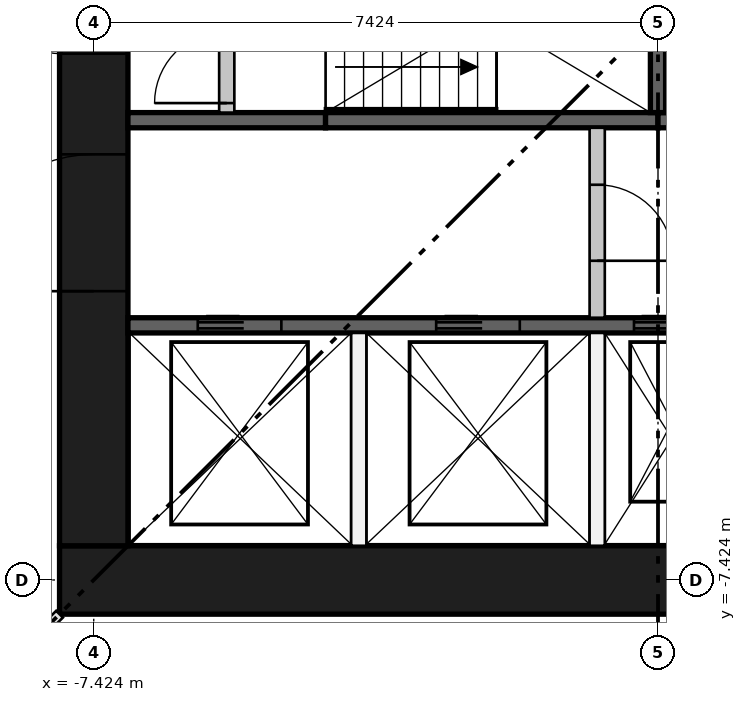
"""IFC4 building model, lengths in metres.
Left out: names, types, materials, properties, quantities, classifications, styles, units other than length and angle.
Written with IfcOpenShell. Run it as: python <this file> out.ifc"""

import sys

from ifc_helpers import new_model, si_unit, direction, frame, frame_2d, origin, place, context, subcontext, project, spatial, rectangle, extrude, element, fill, save


model = new_model("IFC4")
c1 = context("Model", 3, precision=1e-05, world=origin(), true_north=direction((0.0, 1.0)))
c2 = subcontext(c1, "Body", "Model", "MODEL_VIEW")
j1 = project(units=[si_unit("LENGTHUNIT", "METRE"), si_unit("PLANEANGLEUNIT", "RADIAN")], contexts=[c1])
p1 = place(None, origin())
s1 = spatial("IfcSite", under=j1, at=p1, CompositionType="ELEMENT")
p2 = place(p1, origin())
s2 = spatial("IfcBuilding", under=s1, at=p2, CompositionType="ELEMENT")
p3 = place(p2, frame((0.0, 0.0, 14.4)))
s3 = spatial("IfcBuildingStorey", under=s2, at=p3, CompositionType="ELEMENT", Elevation=14.4)
p4 = place(p3, frame((-7.874, -7.424, 0.0), z_axis=(0.0, 0.0, 1.0), x_axis=(1.0, 0.0, 0.0)))
e1 = element("IfcWall", 1, at=p4, inside=s3, PredefinedType="SHEAR", context=c2, shape_type="SweptSolid", body=[
    extrude(rectangle(XDim=15.748, YDim=0.9, at=frame_2d((7.874, 0.0))), origin(), (0.0, 0.0, 1.0), 4.1),
])
p5 = place(p3, frame((-7.424, -6.974, 0.0), z_axis=(0.0, 0.0, 1.0), x_axis=(0.0, 1.0, 0.0)))
e2 = element("IfcWall", 2, at=p5, inside=s3, PredefinedType="SHEAR", context=c2, shape_type="SweptSolid", body=[
    extrude(rectangle(XDim=13.948, YDim=0.9, at=frame_2d((6.974, 0.0))), origin(), (0.0, 0.0, 1.0), 4.1),
])
p6 = place(p5, frame((6.474, 0.0, 0.0)))
e3 = element("IfcOpeningElement", 3, at=p6, cuts=e2, PredefinedType="OPENING", context=c2, shape_type="SweptSolid", body=[
    extrude(rectangle(XDim=1.0, YDim=2.1, at=frame_2d((0.5, 1.05))), frame((0.0, 0.46, 0.0), z_axis=(0.0, -1.0, 0.0), x_axis=(1.0, 0.0, 0.0)), (0.0, 0.0, 1.0), 0.92),
])
p7 = place(p5, frame((3.35, 0.0, 0.0)))
e4 = element("IfcOpeningElement", 4, at=p7, cuts=e2, PredefinedType="OPENING", context=c2, shape_type="SweptSolid", body=[
    extrude(rectangle(XDim=1.8, YDim=2.1, at=frame_2d((0.9, 1.05))), frame((0.0, 0.46, 0.0), z_axis=(0.0, -1.0, 0.0), x_axis=(1.0, 0.0, 0.0)), (0.0, 0.0, 1.0), 0.92),
])
p8 = place(p5, frame((8.799, 0.0, 0.0)))
e5 = element("IfcOpeningElement", 5, at=p8, cuts=e2, PredefinedType="OPENING", context=c2, shape_type="SweptSolid", body=[
    extrude(rectangle(XDim=1.8, YDim=2.1, at=frame_2d((0.9, 1.05))), frame((0.0, 0.46, 0.0), z_axis=(0.0, -1.0, 0.0), x_axis=(1.0, 0.0, 0.0)), (0.0, 0.0, 1.0), 0.92),
])
p9 = place(p5, frame((11.974, 0.0, 0.0)))
e6 = element("IfcOpeningElement", 6, at=p9, cuts=e2, PredefinedType="OPENING", context=c2, shape_type="SweptSolid", body=[
    extrude(rectangle(XDim=1.0, YDim=2.1, at=frame_2d((0.5, 1.05))), frame((0.0, 0.46, 0.0), z_axis=(0.0, -1.0, 0.0), x_axis=(1.0, 0.0, 0.0)), (0.0, 0.0, 1.0), 0.92),
])
p10 = place(p3, frame((-6.974, -4.074, 0.0), z_axis=(0.0, 0.0, 1.0), x_axis=(1.0, 0.0, 0.0)))
e7 = element("IfcWall", 7, at=p10, inside=s3, PredefinedType="SHEAR", context=c2, shape_type="SweptSolid", body=[
    extrude(rectangle(XDim=13.948, YDim=0.2, at=frame_2d((6.974, 0.0))), origin(), (0.0, 0.0, 1.0), 3.7),
])
p11 = place(p10, frame((0.918, 0.0, 0.0)))
e8 = element("IfcOpeningElement", 8, at=p11, cuts=e7, PredefinedType="OPENING", context=c2, shape_type="SweptSolid", body=[
    extrude(rectangle(XDim=1.1, YDim=2.1, at=frame_2d((0.55, 1.05))), frame((0.0, 0.11, 0.0), z_axis=(0.0, -1.0, 0.0), x_axis=(1.0, 0.0, 0.0)), (0.0, 0.0, 1.0), 0.22),
])
p12 = place(p10, frame((4.055, 0.0, 0.0)))
e9 = element("IfcOpeningElement", 9, at=p12, cuts=e7, PredefinedType="OPENING", context=c2, shape_type="SweptSolid", body=[
    extrude(rectangle(XDim=1.1, YDim=2.1, at=frame_2d((0.55, 1.05))), frame((0.0, 0.11, 0.0), z_axis=(0.0, -1.0, 0.0), x_axis=(1.0, 0.0, 0.0)), (0.0, 0.0, 1.0), 0.22),
])
p13 = place(p10, frame((6.658, 0.0, 0.0)))
e10 = element("IfcOpeningElement", 10, at=p13, cuts=e7, PredefinedType="OPENING", context=c2, shape_type="SweptSolid", body=[
    extrude(rectangle(XDim=1.0, YDim=2.1, at=frame_2d((0.5, 1.05))), frame((0.0, 0.11, 0.0), z_axis=(0.0, -1.0, 0.0), x_axis=(1.0, 0.0, 0.0)), (0.0, 0.0, 1.0), 0.22),
])
p14 = place(p10, frame((8.627, 0.0, 0.0)))
e11 = element("IfcOpeningElement", 11, at=p14, cuts=e7, PredefinedType="OPENING", context=c2, shape_type="SweptSolid", body=[
    extrude(rectangle(XDim=1.0, YDim=2.1, at=frame_2d((0.5, 1.05))), frame((0.0, 0.11, 0.0), z_axis=(0.0, -1.0, 0.0), x_axis=(1.0, 0.0, 0.0)), (0.0, 0.0, 1.0), 0.22),
])
p15 = place(p10, frame((10.595, 0.0, 0.0)))
e12 = element("IfcOpeningElement", 12, at=p15, cuts=e7, PredefinedType="OPENING", context=c2, shape_type="SweptSolid", body=[
    extrude(rectangle(XDim=1.0, YDim=2.1, at=frame_2d((0.5, 1.05))), frame((0.0, 0.11, 0.0), z_axis=(0.0, -1.0, 0.0), x_axis=(1.0, 0.0, 0.0)), (0.0, 0.0, 1.0), 0.22),
])
p16 = place(p10, frame((12.564, 0.0, 0.0)))
e13 = element("IfcOpeningElement", 13, at=p16, cuts=e7, PredefinedType="OPENING", context=c2, shape_type="SweptSolid", body=[
    extrude(rectangle(XDim=1.0, YDim=2.1, at=frame_2d((0.5, 1.05))), frame((0.0, 0.11, 0.0), z_axis=(0.0, -1.0, 0.0), x_axis=(1.0, 0.0, 0.0)), (0.0, 0.0, 1.0), 0.22),
])
p17 = place(p3, frame((-6.974, -1.375, 0.0), z_axis=(0.0, 0.0, 1.0), x_axis=(1.0, 0.0, 0.0)))
e14 = element("IfcWall", 14, at=p17, inside=s3, PredefinedType="SHEAR", context=c2, shape_type="SweptSolid", body=[
    extrude(rectangle(XDim=2.6, YDim=0.2, at=frame_2d((1.3, 0.0))), origin(), (0.0, 0.0, 1.0), 3.7),
])
for number, where, z_axis, x_axis in (
    (15, (-4.374, -1.375, 0.0), (0.0, 0.0, 1.0), (1.0, 0.0, 0.0)),
    (16, (0.0, -1.375, 0.0), (0.0, 0.0, 1.0), (1.0, 0.0, 0.0)),
):
    element("IfcWall", number, at=place(p3, frame(where, z_axis=z_axis, x_axis=x_axis)), inside=s3, PredefinedType="SHEAR", context=c2, shape_type="SweptSolid", body=[
        extrude(rectangle(XDim=4.374, YDim=0.2, at=frame_2d((2.187, 0.0))), origin(), (0.0, 0.0, 1.0), 3.7),
    ])
p18 = place(p3, frame((0.0, -1.275, 0.0), z_axis=(0.0, 0.0, 1.0), x_axis=(0.0, 1.0, 0.0)))
e17 = element("IfcWall", 17, at=p18, inside=s3, PredefinedType="SHEAR", context=c2, shape_type="SweptSolid", body=[
    extrude(rectangle(XDim=2.55, YDim=0.2, at=frame_2d((1.275, 0.0))), origin(), (0.0, 0.0, 1.0), 3.7),
])
for number, where, z_axis, x_axis in (
    (18, (-3.937, -6.974, 0.0), (0.0, 0.0, 1.0), (0.0, 1.0, 0.0)),
    (19, (-0.8, -6.974, 0.0), (0.0, 0.0, 1.0), (0.0, 1.0, 0.0)),
):
    element("IfcWall", number, at=place(p3, frame(where, z_axis=z_axis, x_axis=x_axis)), inside=s3, PredefinedType="PARTITIONING", context=c2, shape_type="SweptSolid", body=[
        extrude(rectangle(XDim=2.8, YDim=0.2, at=frame_2d((1.4, 0.0))), origin(), (0.0, 0.0, 1.0), 3.7),
    ])
p19 = place(p3, frame((-0.8, -3.974, 0.0), z_axis=(0.0, 0.0, 1.0), x_axis=(0.0, 1.0, 0.0)))
e20 = element("IfcWall", 20, at=p19, inside=s3, PredefinedType="PARTITIONING", context=c2, shape_type="SweptSolid", body=[
    extrude(rectangle(XDim=2.499, YDim=0.2, at=frame_2d((1.25, 0.0))), origin(), (0.0, 0.0, 1.0), 3.7),
])
p20 = place(p19, frame((0.75, 0.0, 0.0)))
e21 = element("IfcOpeningElement", 21, at=p20, cuts=e20, PredefinedType="OPENING", context=c2, shape_type="SweptSolid", body=[
    extrude(rectangle(XDim=1.0, YDim=2.1, at=frame_2d((0.5, 1.05))), frame((0.0, 0.11, 0.0), z_axis=(0.0, -1.0, 0.0), x_axis=(1.0, 0.0, 0.0)), (0.0, 0.0, 1.0), 0.22),
])
p21 = place(p3, frame((-5.674, -1.275, 0.0), z_axis=(0.0, 0.0, 1.0), x_axis=(0.0, 1.0, 0.0)))
e22 = element("IfcWall", 22, at=p21, inside=s3, PredefinedType="PARTITIONING", context=c2, shape_type="SweptSolid", body=[
    extrude(rectangle(XDim=2.55, YDim=0.2, at=frame_2d((1.275, 0.0))), origin(), (0.0, 0.0, 1.0), 3.7),
])
p22 = place(p21, frame((0.125, 0.0, 0.0)))
e23 = element("IfcOpeningElement", 23, at=p22, cuts=e22, PredefinedType="OPENING", context=c2, shape_type="SweptSolid", body=[
    extrude(rectangle(XDim=0.95, YDim=2.1, at=frame_2d((0.475, 1.05))), frame((0.0, 0.11, 0.0), z_axis=(0.0, -1.0, 0.0), x_axis=(1.0, 0.0, 0.0)), (0.0, 0.0, 1.0), 0.22),
])
p23 = place(p21, frame((1.475, 0.0, 0.0)))
e24 = element("IfcOpeningElement", 24, at=p23, cuts=e22, PredefinedType="OPENING", context=c2, shape_type="SweptSolid", body=[
    extrude(rectangle(XDim=0.95, YDim=2.1, at=frame_2d((0.475, 1.05))), frame((0.0, 0.11, 0.0), z_axis=(0.0, -1.0, 0.0), x_axis=(1.0, 0.0, 0.0)), (0.0, 0.0, 1.0), 0.22),
])
p24 = place(p3, frame((-7.874, -7.874, 0.0), z_axis=(0.0, 0.0, 1.0), x_axis=(-0.707106781187, -0.707106781187, 0.0)))
e25 = element("IfcWall", 25, at=p24, inside=s3, PredefinedType="PARTITIONING", context=c2, shape_type="SweptSolid", body=[
    extrude(rectangle(XDim=2.102, YDim=0.125, at=frame_2d((1.051, 0.0))), origin(), (0.0, 0.0, 1.0), 3.7),
])
p25 = place(p24, frame((0.6, 0.0, 0.0)))
e26 = element("IfcOpeningElement", 26, at=p25, cuts=e25, PredefinedType="OPENING", context=c2, shape_type="SweptSolid", body=[
    extrude(rectangle(XDim=1.0, YDim=2.1, at=frame_2d((0.5, 1.05))), frame((0.0, 0.073, 0.0), z_axis=(0.0, -1.0, 0.0), x_axis=(1.0, 0.0, 0.0)), (0.0, 0.0, 1.0), 0.145),
])
p26 = place(p11, origin())
e27 = element("IfcDoor", 27, at=p26, inside=s3, OperationType="DOUBLE_DOOR_SLIDING", PredefinedType="DOOR", context=c2, shape_type="SweptSolid", body=[
    extrude(rectangle(XDim=1.1, YDim=2.1, at=frame_2d((0.55, 1.05))), frame((0.0, 0.025, 0.0), z_axis=(0.0, -1.0, 0.0), x_axis=(1.0, 0.0, 0.0)), (0.0, 0.0, 1.0), 0.05),
])
fill(e8, e27)
p27 = place(p12, origin())
e28 = element("IfcDoor", 28, at=p27, inside=s3, OperationType="DOUBLE_DOOR_SLIDING", PredefinedType="DOOR", context=c2, shape_type="SweptSolid", body=[
    extrude(rectangle(XDim=1.1, YDim=2.1, at=frame_2d((0.55, 1.05))), frame((0.0, 0.025, 0.0), z_axis=(0.0, -1.0, 0.0), x_axis=(1.0, 0.0, 0.0)), (0.0, 0.0, 1.0), 0.05),
])
fill(e9, e28)
p28 = place(p13, origin())
e29 = element("IfcDoor", 29, at=p28, inside=s3, OperationType="DOUBLE_DOOR_SLIDING", PredefinedType="DOOR", context=c2, shape_type="SweptSolid", body=[
    extrude(rectangle(XDim=1.0, YDim=2.1, at=frame_2d((0.5, 1.05))), frame((0.0, 0.025, 0.0), z_axis=(0.0, -1.0, 0.0), x_axis=(1.0, 0.0, 0.0)), (0.0, 0.0, 1.0), 0.05),
])
fill(e10, e29)
p29 = place(p22, origin())
e30 = element("IfcDoor", 30, at=p29, inside=s3, OperationType="SINGLE_SWING_LEFT", PredefinedType="DOOR", context=c2, shape_type="SweptSolid", body=[
    extrude(rectangle(XDim=0.95, YDim=2.1, at=frame_2d((0.475, 1.05))), frame((0.0, 0.025, 0.0), z_axis=(0.0, -1.0, 0.0), x_axis=(1.0, 0.0, 0.0)), (0.0, 0.0, 1.0), 0.05),
])
fill(e23, e30)
p30 = place(p20, frame((1.0, 0.0, 0.0), z_axis=(0.0, 0.0, 1.0), x_axis=(-1.0, 0.0, 0.0)))
e31 = element("IfcDoor", 31, at=p30, inside=s3, OperationType="SINGLE_SWING_LEFT", PredefinedType="DOOR", context=c2, shape_type="SweptSolid", body=[
    extrude(rectangle(XDim=1.0, YDim=2.1, at=frame_2d((0.5, 1.05))), frame((0.0, 0.025, 0.0), z_axis=(0.0, -1.0, 0.0), x_axis=(1.0, 0.0, 0.0)), (0.0, 0.0, 1.0), 0.05),
])
fill(e21, e31)
p31 = place(p6, origin())
e32 = element("IfcDoor", 32, at=p31, inside=s3, OperationType="SINGLE_SWING_RIGHT", PredefinedType="DOOR", context=c2, shape_type="SweptSolid", body=[
    extrude(rectangle(XDim=1.0, YDim=2.1, at=frame_2d((0.5, 1.05))), frame((0.0, 0.45, 0.0), z_axis=(0.0, -1.0, 0.0), x_axis=(1.0, 0.0, 0.0)), (0.0, 0.0, 1.0), 0.05),
])
fill(e3, e32)
p32 = place(p7, origin())
e33 = element("IfcDoor", 33, at=p32, inside=s3, OperationType="DOUBLE_DOOR_SINGLE_SWING", PredefinedType="DOOR", context=c2, shape_type="SweptSolid", body=[
    extrude(rectangle(XDim=1.8, YDim=2.1, at=frame_2d((0.9, 1.05))), frame((0.0, 0.025, 0.0), z_axis=(0.0, -1.0, 0.0), x_axis=(1.0, 0.0, 0.0)), (0.0, 0.0, 1.0), 0.05),
])
fill(e4, e33)
save(model, sys.argv[1])
